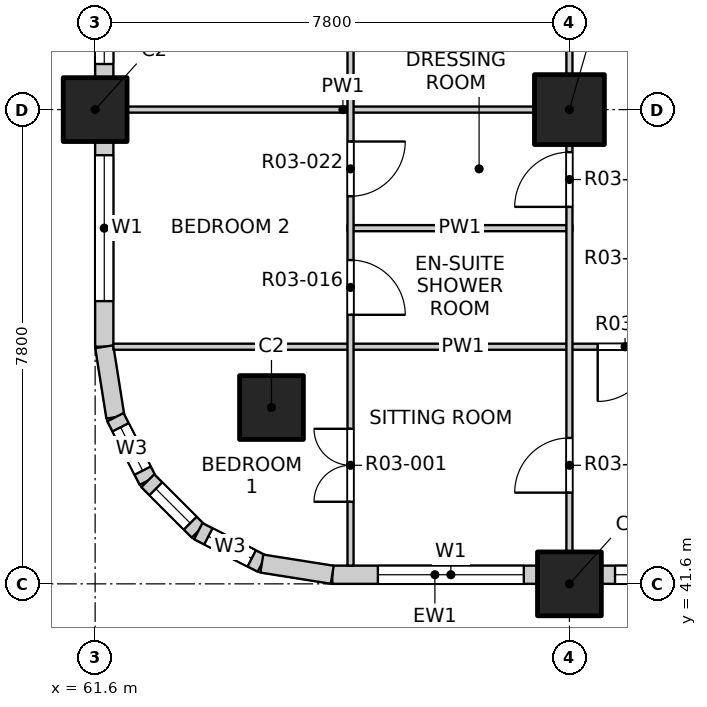
"""IFC4 building model, lengths in metres.
Left out: names, types, materials, properties, quantities, classifications, styles, units other than length and angle.
Written with IfcOpenShell. Run it as: python <this file> out.ifc"""

import sys

from ifc_helpers import new_model, si_unit, direction, frame, frame_2d, origin, origin_2d, place, context, subcontext, project, spatial, rectangle, extrude, element, fill, save


model = new_model("IFC4")
c1 = context("Model", 3, precision=1e-05, world=origin(), true_north=direction((0.0, 1.0)))
c2 = subcontext(c1, "Body", "Model", "MODEL_VIEW")
j1 = project(units=[si_unit("LENGTHUNIT", "METRE"), si_unit("PLANEANGLEUNIT", "RADIAN")], contexts=[c1])
p1 = place(None, origin())
s1 = spatial("IfcSite", under=j1, at=p1, CompositionType="ELEMENT")
p2 = place(p1, origin())
s2 = spatial("IfcBuilding", under=s1, at=p2, CompositionType="ELEMENT")
p3 = place(p2, frame((0.0, 0.0, 43.3)))
s3 = spatial("IfcBuildingStorey", under=s2, at=p3, CompositionType="ELEMENT", Elevation=43.3)
for number, where, z_axis, x_axis in (
    (1, (64.5, 44.5, -0.25), (0.0, 0.0, 1.0), (1.0, 0.0, 0.0)),
    (2, (61.6, 49.4, -0.25), (0.0, 0.0, 1.0), (1.0, 0.0, 0.0)),
    (3, (69.4, 41.6, -0.25), (0.0, 0.0, 1.0), (1.0, 0.0, 0.0)),
):
    element("IfcColumn", number, at=place(p3, frame(where, z_axis=z_axis, x_axis=x_axis)), inside=s3, PredefinedType="COLUMN", context=c2, shape_type="SweptSolid", body=[
        extrude(rectangle(XDim=1.05, YDim=1.05, at=origin_2d()), origin(), (0.0, 0.0, 1.0), 3.35),
    ])
p4 = place(p3, frame((69.4, 49.4, -0.25), z_axis=(0.0, 0.0, 1.0), x_axis=(1.0, 0.0, 0.0)))
e4 = element("IfcColumn", 4, at=p4, inside=s3, PredefinedType="COLUMN", context=c2, shape_type="SweptSolid", body=[
    extrude(rectangle(XDim=1.15, YDim=1.15, at=origin_2d()), origin(), (0.0, 0.0, 1.0), 3.35),
])
p5 = place(p3, frame((65.5, 41.75, 0.0), z_axis=(0.0, 0.0, 1.0), x_axis=(1.0, 0.0, 0.0)))
e5 = element("IfcWall", 5, at=p5, inside=s3, PredefinedType="SOLIDWALL", context=c2, shape_type="SweptSolid", body=[
    extrude(rectangle(XDim=3.375, YDim=0.3, at=frame_2d((1.688, 0.0))), origin(), (0.0, 0.0, 1.0), 3.1),
])
p6 = place(p5, frame((0.75, 0.0, 0.9)))
e6 = element("IfcOpeningElement", 6, at=p6, cuts=e5, PredefinedType="OPENING", context=c2, shape_type="SweptSolid", body=[
    extrude(rectangle(XDim=2.4, YDim=1.8, at=frame_2d((1.2, 0.9))), frame((0.0, 0.16, 0.0), z_axis=(0.0, -1.0, 0.0), x_axis=(1.0, 0.0, 0.0)), (0.0, 0.0, 1.0), 0.32),
])
p7 = place(p3, frame((69.925, 41.75, 0.0), z_axis=(0.0, 0.0, 1.0), x_axis=(1.0, 0.0, 0.0)))
e7 = element("IfcWall", 7, at=p7, inside=s3, PredefinedType="SOLIDWALL", context=c2, shape_type="SweptSolid", body=[
    extrude(rectangle(XDim=6.75, YDim=0.3, at=frame_2d((3.375, 0.0))), origin(), (0.0, 0.0, 1.0), 3.1),
])
p8 = place(p7, frame((0.225, 0.0, 0.9)))
e8 = element("IfcOpeningElement", 8, at=p8, cuts=e7, PredefinedType="OPENING", context=c2, shape_type="SweptSolid", body=[
    extrude(rectangle(XDim=2.4, YDim=1.8, at=frame_2d((1.2, 0.9))), frame((0.0, 0.16, 0.0), z_axis=(0.0, -1.0, 0.0), x_axis=(1.0, 0.0, 0.0)), (0.0, 0.0, 1.0), 0.32),
])
p9 = place(p7, frame((4.125, 0.0, 0.9)))
e9 = element("IfcOpeningElement", 9, at=p9, cuts=e7, PredefinedType="OPENING", context=c2, shape_type="SweptSolid", body=[
    extrude(rectangle(XDim=2.4, YDim=1.8, at=frame_2d((1.2, 0.9))), frame((0.0, 0.16, 0.0), z_axis=(0.0, -1.0, 0.0), x_axis=(1.0, 0.0, 0.0)), (0.0, 0.0, 1.0), 0.32),
])
p10 = place(p3, frame((61.75, 45.5, 0.0), z_axis=(0.0, 0.0, 1.0), x_axis=(0.0, 1.0, 0.0)))
e10 = element("IfcWall", 10, at=p10, inside=s3, PredefinedType="SOLIDWALL", context=c2, shape_type="SweptSolid", body=[
    extrude(rectangle(XDim=3.375, YDim=0.3, at=frame_2d((1.688, 0.0))), origin(), (0.0, 0.0, 1.0), 3.1),
])
p11 = place(p10, frame((0.75, 0.0, 0.9)))
e11 = element("IfcOpeningElement", 11, at=p11, cuts=e10, PredefinedType="OPENING", context=c2, shape_type="SweptSolid", body=[
    extrude(rectangle(XDim=2.4, YDim=1.8, at=frame_2d((1.2, 0.9))), frame((0.0, 0.16, 0.0), z_axis=(0.0, -1.0, 0.0), x_axis=(1.0, 0.0, 0.0)), (0.0, 0.0, 1.0), 0.32),
])
p12 = place(p3, frame((61.75, 49.925, 0.0), z_axis=(0.0, 0.0, 1.0), x_axis=(0.0, 1.0, 0.0)))
e12 = element("IfcWall", 12, at=p12, inside=s3, PredefinedType="SOLIDWALL", context=c2, shape_type="SweptSolid", body=[
    extrude(rectangle(XDim=6.75, YDim=0.3, at=frame_2d((3.375, 0.0))), origin(), (0.0, 0.0, 1.0), 3.1),
])
p13 = place(p12, frame((0.225, 0.0, 0.9)))
e13 = element("IfcOpeningElement", 13, at=p13, cuts=e12, PredefinedType="OPENING", context=c2, shape_type="SweptSolid", body=[
    extrude(rectangle(XDim=2.4, YDim=1.8, at=frame_2d((1.2, 0.9))), frame((0.0, 0.16, 0.0), z_axis=(0.0, -1.0, 0.0), x_axis=(1.0, 0.0, 0.0)), (0.0, 0.0, 1.0), 0.32),
])
p14 = place(p12, frame((4.125, 0.0, 0.9)))
e14 = element("IfcOpeningElement", 14, at=p14, cuts=e12, PredefinedType="OPENING", context=c2, shape_type="SweptSolid", body=[
    extrude(rectangle(XDim=2.4, YDim=1.8, at=frame_2d((1.2, 0.9))), frame((0.0, 0.16, 0.0), z_axis=(0.0, -1.0, 0.0), x_axis=(1.0, 0.0, 0.0)), (0.0, 0.0, 1.0), 0.32),
])
p15 = place(p3, frame((61.75, 45.5, 0.0), z_axis=(0.0, 0.0, 1.0), x_axis=(0.156496880861, -0.987678452879, 0.0)))
e15 = element("IfcWall", 15, at=p15, inside=s3, PredefinedType="SOLIDWALL", context=c2, shape_type="SweptSolid", body=[
    extrude(rectangle(XDim=1.173, YDim=0.3, at=frame_2d((0.586, 0.0))), origin(), (0.0, 0.0, 1.0), 3.1),
])
p16 = place(p3, frame((61.934, 44.341, 0.0), z_axis=(0.0, 0.0, 1.0), x_axis=(0.454025524128, -0.890988677504, 0.0)))
e16 = element("IfcWall", 16, at=p16, inside=s3, PredefinedType="SOLIDWALL", context=c2, shape_type="SweptSolid", body=[
    extrude(rectangle(XDim=1.173, YDim=0.3, at=frame_2d((0.587, 0.0))), origin(), (0.0, 0.0, 1.0), 3.1),
])
p17 = place(p16, frame((0.187, 0.0, 0.9)))
e17 = element("IfcOpeningElement", 17, at=p17, cuts=e16, PredefinedType="OPENING", context=c2, shape_type="SweptSolid", body=[
    extrude(rectangle(XDim=0.8, YDim=1.2, at=frame_2d((0.4, 0.6))), frame((0.0, 0.16, 0.0), z_axis=(0.0, -1.0, 0.0), x_axis=(1.0, 0.0, 0.0)), (0.0, 0.0, 1.0), 0.32),
])
p18 = place(p3, frame((62.466, 43.296, 0.0), z_axis=(0.0, 0.0, 1.0), x_axis=(0.707106781187, -0.707106781187, 0.0)))
e18 = element("IfcWall", 18, at=p18, inside=s3, PredefinedType="SOLIDWALL", context=c2, shape_type="SweptSolid", body=[
    extrude(rectangle(XDim=1.173, YDim=0.3, at=frame_2d((0.586, 0.0))), origin(), (0.0, 0.0, 1.0), 3.1),
])
p19 = place(p18, frame((0.187, 0.0, 0.9)))
e19 = element("IfcOpeningElement", 19, at=p19, cuts=e18, PredefinedType="OPENING", context=c2, shape_type="SweptSolid", body=[
    extrude(rectangle(XDim=0.8, YDim=1.2, at=frame_2d((0.4, 0.6))), frame((0.0, 0.16, 0.0), z_axis=(0.0, -1.0, 0.0), x_axis=(1.0, 0.0, 0.0)), (0.0, 0.0, 1.0), 0.32),
])
p20 = place(p3, frame((63.296, 42.466, 0.0), z_axis=(0.0, 0.0, 1.0), x_axis=(0.890988677504, -0.454025524128, 0.0)))
e20 = element("IfcWall", 20, at=p20, inside=s3, PredefinedType="SOLIDWALL", context=c2, shape_type="SweptSolid", body=[
    extrude(rectangle(XDim=1.173, YDim=0.3, at=frame_2d((0.587, 0.0))), origin(), (0.0, 0.0, 1.0), 3.1),
])
p21 = place(p20, frame((0.187, 0.0, 0.9)))
e21 = element("IfcOpeningElement", 21, at=p21, cuts=e20, PredefinedType="OPENING", context=c2, shape_type="SweptSolid", body=[
    extrude(rectangle(XDim=0.8, YDim=1.2, at=frame_2d((0.4, 0.6))), frame((0.0, 0.16, 0.0), z_axis=(0.0, -1.0, 0.0), x_axis=(1.0, 0.0, 0.0)), (0.0, 0.0, 1.0), 0.32),
])
p22 = place(p3, frame((64.341, 41.934, 0.0), z_axis=(0.0, 0.0, 1.0), x_axis=(0.987678452879, -0.156496880861, 0.0)))
e22 = element("IfcWall", 22, at=p22, inside=s3, PredefinedType="SOLIDWALL", context=c2, shape_type="SweptSolid", body=[
    extrude(rectangle(XDim=1.173, YDim=0.3, at=frame_2d((0.586, 0.0))), origin(), (0.0, 0.0, 1.0), 3.1),
])
p23 = place(p3, frame((61.9, 45.5, 0.0), z_axis=(0.0, 0.0, 1.0), x_axis=(1.0, 0.0, 0.0)))
e23 = element("IfcWall", 23, at=p23, inside=s3, PredefinedType="PARTITIONING", context=c2, shape_type="SweptSolid", body=[
    extrude(rectangle(XDim=11.5, YDim=0.1, at=frame_2d((5.75, 0.0))), origin(), (0.0, 0.0, 1.0), 3.1),
])
p24 = place(p23, frame((7.965, 0.0, 0.0)))
e24 = element("IfcOpeningElement", 24, at=p24, cuts=e23, PredefinedType="OPENING", context=c2, shape_type="SweptSolid", body=[
    extrude(rectangle(XDim=0.9, YDim=2.1, at=frame_2d((0.45, 1.05))), frame((0.0, 0.06, 0.0), z_axis=(0.0, -1.0, 0.0), x_axis=(1.0, 0.0, 0.0)), (0.0, 0.0, 1.0), 0.12),
])
p25 = place(p3, frame((65.75, 47.45, 0.0), z_axis=(0.0, 0.0, 1.0), x_axis=(1.0, 0.0, 0.0)))
e25 = element("IfcWall", 25, at=p25, inside=s3, PredefinedType="PARTITIONING", context=c2, shape_type="SweptSolid", body=[
    extrude(rectangle(XDim=3.7, YDim=0.1, at=frame_2d((1.85, 0.0))), origin(), (0.0, 0.0, 1.0), 3.1),
])
p26 = place(p3, frame((61.9, 49.4, 0.0), z_axis=(0.0, 0.0, 1.0), x_axis=(1.0, 0.0, 0.0)))
e26 = element("IfcWall", 26, at=p26, inside=s3, PredefinedType="PARTITIONING", context=c2, shape_type="SweptSolid", body=[
    extrude(rectangle(XDim=7.55, YDim=0.1, at=frame_2d((3.775, 0.0))), origin(), (0.0, 0.0, 1.0), 3.1),
])
p27 = place(p3, frame((65.8, 41.9, 0.0), z_axis=(0.0, 0.0, 1.0), x_axis=(0.0, 1.0, 0.0)))
e27 = element("IfcWall", 27, at=p27, inside=s3, PredefinedType="PARTITIONING", context=c2, shape_type="SweptSolid", body=[
    extrude(rectangle(XDim=19.1, YDim=0.1, at=frame_2d((9.55, 0.0))), origin(), (0.0, 0.0, 1.0), 3.1),
])
p28 = place(p27, frame((1.05, 0.0, 0.0)))
e28 = element("IfcOpeningElement", 28, at=p28, cuts=e27, PredefinedType="OPENING", context=c2, shape_type="SweptSolid", body=[
    extrude(rectangle(XDim=1.2, YDim=2.1, at=frame_2d((0.6, 1.05))), frame((0.0, 0.06, 0.0), z_axis=(0.0, -1.0, 0.0), x_axis=(1.0, 0.0, 0.0)), (0.0, 0.0, 1.0), 0.12),
])
p29 = place(p27, frame((4.125, 0.0, 0.0)))
e29 = element("IfcOpeningElement", 29, at=p29, cuts=e27, PredefinedType="OPENING", context=c2, shape_type="SweptSolid", body=[
    extrude(rectangle(XDim=0.9, YDim=2.1, at=frame_2d((0.45, 1.05))), frame((0.0, 0.06, 0.0), z_axis=(0.0, -1.0, 0.0), x_axis=(1.0, 0.0, 0.0)), (0.0, 0.0, 1.0), 0.12),
])
p30 = place(p27, frame((6.075, 0.0, 0.0)))
e30 = element("IfcOpeningElement", 30, at=p30, cuts=e27, PredefinedType="OPENING", context=c2, shape_type="SweptSolid", body=[
    extrude(rectangle(XDim=0.9, YDim=2.1, at=frame_2d((0.45, 1.05))), frame((0.0, 0.06, 0.0), z_axis=(0.0, -1.0, 0.0), x_axis=(1.0, 0.0, 0.0)), (0.0, 0.0, 1.0), 0.12),
])
p31 = place(p27, frame((8.85, 0.0, 0.0)))
e31 = element("IfcOpeningElement", 31, at=p31, cuts=e27, PredefinedType="OPENING", context=c2, shape_type="SweptSolid", body=[
    extrude(rectangle(XDim=1.2, YDim=2.1, at=frame_2d((0.6, 1.05))), frame((0.0, 0.06, 0.0), z_axis=(0.0, -1.0, 0.0), x_axis=(1.0, 0.0, 0.0)), (0.0, 0.0, 1.0), 0.12),
])
p32 = place(p27, frame((11.925, 0.0, 0.0)))
e32 = element("IfcOpeningElement", 32, at=p32, cuts=e27, PredefinedType="OPENING", context=c2, shape_type="SweptSolid", body=[
    extrude(rectangle(XDim=0.9, YDim=2.1, at=frame_2d((0.45, 1.05))), frame((0.0, 0.06, 0.0), z_axis=(0.0, -1.0, 0.0), x_axis=(1.0, 0.0, 0.0)), (0.0, 0.0, 1.0), 0.12),
])
p33 = place(p27, frame((13.875, 0.0, 0.0)))
e33 = element("IfcOpeningElement", 33, at=p33, cuts=e27, PredefinedType="OPENING", context=c2, shape_type="SweptSolid", body=[
    extrude(rectangle(XDim=0.9, YDim=2.1, at=frame_2d((0.45, 1.05))), frame((0.0, 0.06, 0.0), z_axis=(0.0, -1.0, 0.0), x_axis=(1.0, 0.0, 0.0)), (0.0, 0.0, 1.0), 0.12),
])
p34 = place(p27, frame((15.825, 0.0, 0.0)))
e34 = element("IfcOpeningElement", 34, at=p34, cuts=e27, PredefinedType="OPENING", context=c2, shape_type="SweptSolid", body=[
    extrude(rectangle(XDim=0.9, YDim=2.1, at=frame_2d((0.45, 1.05))), frame((0.0, 0.06, 0.0), z_axis=(0.0, -1.0, 0.0), x_axis=(1.0, 0.0, 0.0)), (0.0, 0.0, 1.0), 0.12),
])
p35 = place(p27, frame((17.775, 0.0, 0.0)))
e35 = element("IfcOpeningElement", 35, at=p35, cuts=e27, PredefinedType="OPENING", context=c2, shape_type="SweptSolid", body=[
    extrude(rectangle(XDim=0.9, YDim=2.1, at=frame_2d((0.45, 1.05))), frame((0.0, 0.06, 0.0), z_axis=(0.0, -1.0, 0.0), x_axis=(1.0, 0.0, 0.0)), (0.0, 0.0, 1.0), 0.12),
])
p36 = place(p3, frame((69.4, 41.9, 0.0), z_axis=(0.0, 0.0, 1.0), x_axis=(0.0, 1.0, 0.0)))
e36 = element("IfcWall", 36, at=p36, inside=s3, PredefinedType="PARTITIONING", context=c2, shape_type="SweptSolid", body=[
    extrude(rectangle(XDim=46.2, YDim=0.1, at=frame_2d((23.1, 0.0))), origin(), (0.0, 0.0, 1.0), 3.1),
])
p37 = place(p36, frame((1.2, 0.0, 0.0)))
e37 = element("IfcOpeningElement", 37, at=p37, cuts=e36, PredefinedType="OPENING", context=c2, shape_type="SweptSolid", body=[
    extrude(rectangle(XDim=0.9, YDim=2.1, at=frame_2d((0.45, 1.05))), frame((0.0, 0.06, 0.0), z_axis=(0.0, -1.0, 0.0), x_axis=(1.0, 0.0, 0.0)), (0.0, 0.0, 1.0), 0.12),
])
p38 = place(p36, frame((5.9, 0.0, 0.0)))
e38 = element("IfcOpeningElement", 38, at=p38, cuts=e36, PredefinedType="OPENING", context=c2, shape_type="SweptSolid", body=[
    extrude(rectangle(XDim=0.9, YDim=2.1, at=frame_2d((0.45, 1.05))), frame((0.0, 0.06, 0.0), z_axis=(0.0, -1.0, 0.0), x_axis=(1.0, 0.0, 0.0)), (0.0, 0.0, 1.0), 0.12),
])
p39 = place(p36, frame((9.0, 0.0, 0.0)))
e39 = element("IfcOpeningElement", 39, at=p39, cuts=e36, PredefinedType="OPENING", context=c2, shape_type="SweptSolid", body=[
    extrude(rectangle(XDim=0.9, YDim=2.1, at=frame_2d((0.45, 1.05))), frame((0.0, 0.06, 0.0), z_axis=(0.0, -1.0, 0.0), x_axis=(1.0, 0.0, 0.0)), (0.0, 0.0, 1.0), 0.12),
])
p40 = place(p36, frame((13.725, 0.0, 0.0)))
e40 = element("IfcOpeningElement", 40, at=p40, cuts=e36, PredefinedType="OPENING", context=c2, shape_type="SweptSolid", body=[
    extrude(rectangle(XDim=0.9, YDim=2.1, at=frame_2d((0.45, 1.05))), frame((0.0, 0.06, 0.0), z_axis=(0.0, -1.0, 0.0), x_axis=(1.0, 0.0, 0.0)), (0.0, 0.0, 1.0), 0.12),
])
p41 = place(p36, frame((17.775, 0.0, 0.0)))
e41 = element("IfcOpeningElement", 41, at=p41, cuts=e36, PredefinedType="OPENING", context=c2, shape_type="SweptSolid", body=[
    extrude(rectangle(XDim=0.9, YDim=2.1, at=frame_2d((0.45, 1.05))), frame((0.0, 0.06, 0.0), z_axis=(0.0, -1.0, 0.0), x_axis=(1.0, 0.0, 0.0)), (0.0, 0.0, 1.0), 0.12),
])
p42 = place(p36, frame((20.7, 0.0, 0.0)))
e42 = element("IfcOpeningElement", 42, at=p42, cuts=e36, PredefinedType="OPENING", context=c2, shape_type="SweptSolid", body=[
    extrude(rectangle(XDim=0.9, YDim=2.1, at=frame_2d((0.45, 1.05))), frame((0.0, 0.06, 0.0), z_axis=(0.0, -1.0, 0.0), x_axis=(1.0, 0.0, 0.0)), (0.0, 0.0, 1.0), 0.12),
])
p43 = place(p36, frame((25.575, 0.0, 0.0)))
e43 = element("IfcOpeningElement", 43, at=p43, cuts=e36, PredefinedType="OPENING", context=c2, shape_type="SweptSolid", body=[
    extrude(rectangle(XDim=0.9, YDim=2.1, at=frame_2d((0.45, 1.05))), frame((0.0, 0.06, 0.0), z_axis=(0.0, -1.0, 0.0), x_axis=(1.0, 0.0, 0.0)), (0.0, 0.0, 1.0), 0.12),
])
p44 = place(p36, frame((28.5, 0.0, 0.0)))
e44 = element("IfcOpeningElement", 44, at=p44, cuts=e36, PredefinedType="OPENING", context=c2, shape_type="SweptSolid", body=[
    extrude(rectangle(XDim=0.9, YDim=2.1, at=frame_2d((0.45, 1.05))), frame((0.0, 0.06, 0.0), z_axis=(0.0, -1.0, 0.0), x_axis=(1.0, 0.0, 0.0)), (0.0, 0.0, 1.0), 0.12),
])
p45 = place(p36, frame((33.375, 0.0, 0.0)))
e45 = element("IfcOpeningElement", 45, at=p45, cuts=e36, PredefinedType="OPENING", context=c2, shape_type="SweptSolid", body=[
    extrude(rectangle(XDim=0.9, YDim=2.1, at=frame_2d((0.45, 1.05))), frame((0.0, 0.06, 0.0), z_axis=(0.0, -1.0, 0.0), x_axis=(1.0, 0.0, 0.0)), (0.0, 0.0, 1.0), 0.12),
])
p46 = place(p36, frame((36.3, 0.0, 0.0)))
e46 = element("IfcOpeningElement", 46, at=p46, cuts=e36, PredefinedType="OPENING", context=c2, shape_type="SweptSolid", body=[
    extrude(rectangle(XDim=0.9, YDim=2.1, at=frame_2d((0.45, 1.05))), frame((0.0, 0.06, 0.0), z_axis=(0.0, -1.0, 0.0), x_axis=(1.0, 0.0, 0.0)), (0.0, 0.0, 1.0), 0.12),
])
p47 = place(p36, frame((40.2, 0.0, 0.0)))
e47 = element("IfcOpeningElement", 47, at=p47, cuts=e36, PredefinedType="OPENING", context=c2, shape_type="SweptSolid", body=[
    extrude(rectangle(XDim=0.9, YDim=2.1, at=frame_2d((0.45, 1.05))), frame((0.0, 0.06, 0.0), z_axis=(0.0, -1.0, 0.0), x_axis=(1.0, 0.0, 0.0)), (0.0, 0.0, 1.0), 0.12),
])
p48 = place(p36, frame((44.1, 0.0, 0.0)))
e48 = element("IfcOpeningElement", 48, at=p48, cuts=e36, PredefinedType="OPENING", context=c2, shape_type="SweptSolid", body=[
    extrude(rectangle(XDim=0.9, YDim=2.1, at=frame_2d((0.45, 1.05))), frame((0.0, 0.06, 0.0), z_axis=(0.0, -1.0, 0.0), x_axis=(1.0, 0.0, 0.0)), (0.0, 0.0, 1.0), 0.12),
])
p49 = place(p6, origin())
e49 = element("IfcWindow", 49, at=p49, inside=s3, PartitioningType="DOUBLE_PANEL_VERTICAL", PredefinedType="WINDOW", context=c2, shape_type="SweptSolid", body=[
    extrude(rectangle(XDim=2.4, YDim=1.8, at=frame_2d((1.2, 0.9))), frame((0.0, 0.03, 0.0), z_axis=(0.0, -1.0, 0.0), x_axis=(1.0, 0.0, 0.0)), (0.0, 0.0, 1.0), 0.06),
])
fill(e6, e49)
p50 = place(p8, origin())
e50 = element("IfcWindow", 50, at=p50, inside=s3, PartitioningType="DOUBLE_PANEL_VERTICAL", PredefinedType="WINDOW", context=c2, shape_type="SweptSolid", body=[
    extrude(rectangle(XDim=2.4, YDim=1.8, at=frame_2d((1.2, 0.9))), frame((0.0, 0.03, 0.0), z_axis=(0.0, -1.0, 0.0), x_axis=(1.0, 0.0, 0.0)), (0.0, 0.0, 1.0), 0.06),
])
fill(e8, e50)
p51 = place(p11, origin())
e51 = element("IfcWindow", 51, at=p51, inside=s3, PartitioningType="DOUBLE_PANEL_VERTICAL", PredefinedType="WINDOW", context=c2, shape_type="SweptSolid", body=[
    extrude(rectangle(XDim=2.4, YDim=1.8, at=frame_2d((1.2, 0.9))), frame((0.0, 0.03, 0.0), z_axis=(0.0, -1.0, 0.0), x_axis=(1.0, 0.0, 0.0)), (0.0, 0.0, 1.0), 0.06),
])
fill(e11, e51)
p52 = place(p13, origin())
e52 = element("IfcWindow", 52, at=p52, inside=s3, PartitioningType="DOUBLE_PANEL_VERTICAL", PredefinedType="WINDOW", context=c2, shape_type="SweptSolid", body=[
    extrude(rectangle(XDim=2.4, YDim=1.8, at=frame_2d((1.2, 0.9))), frame((0.0, 0.03, 0.0), z_axis=(0.0, -1.0, 0.0), x_axis=(1.0, 0.0, 0.0)), (0.0, 0.0, 1.0), 0.06),
])
fill(e13, e52)
p53 = place(p17, origin())
e53 = element("IfcWindow", 53, at=p53, inside=s3, PartitioningType="SINGLE_PANEL", PredefinedType="WINDOW", context=c2, shape_type="SweptSolid", body=[
    extrude(rectangle(XDim=0.8, YDim=1.2, at=frame_2d((0.4, 0.6))), frame((0.0, 0.03, 0.0), z_axis=(0.0, -1.0, 0.0), x_axis=(1.0, 0.0, 0.0)), (0.0, 0.0, 1.0), 0.06),
])
fill(e17, e53)
p54 = place(p19, origin())
e54 = element("IfcWindow", 54, at=p54, inside=s3, PartitioningType="SINGLE_PANEL", PredefinedType="WINDOW", context=c2, shape_type="SweptSolid", body=[
    extrude(rectangle(XDim=0.8, YDim=1.2, at=frame_2d((0.4, 0.6))), frame((0.0, 0.03, 0.0), z_axis=(0.0, -1.0, 0.0), x_axis=(1.0, 0.0, 0.0)), (0.0, 0.0, 1.0), 0.06),
])
fill(e19, e54)
p55 = place(p21, origin())
e55 = element("IfcWindow", 55, at=p55, inside=s3, PartitioningType="SINGLE_PANEL", PredefinedType="WINDOW", context=c2, shape_type="SweptSolid", body=[
    extrude(rectangle(XDim=0.8, YDim=1.2, at=frame_2d((0.4, 0.6))), frame((0.0, 0.03, 0.0), z_axis=(0.0, -1.0, 0.0), x_axis=(1.0, 0.0, 0.0)), (0.0, 0.0, 1.0), 0.06),
])
fill(e21, e55)
p56 = place(p28, origin())
e56 = element("IfcDoor", 56, at=p56, inside=s3, OperationType="DOUBLE_DOOR_SINGLE_SWING", PredefinedType="DOOR", context=c2, shape_type="SweptSolid", body=[
    extrude(rectangle(XDim=1.2, YDim=2.1, at=frame_2d((0.6, 1.05))), frame((0.0, 0.025, 0.0), z_axis=(0.0, -1.0, 0.0), x_axis=(1.0, 0.0, 0.0)), (0.0, 0.0, 1.0), 0.05),
])
fill(e28, e56)
p57 = place(p37, origin())
e57 = element("IfcDoor", 57, at=p57, inside=s3, OperationType="SINGLE_SWING_LEFT", PredefinedType="DOOR", context=c2, shape_type="SweptSolid", body=[
    extrude(rectangle(XDim=0.9, YDim=2.1, at=frame_2d((0.45, 1.05))), frame((0.0, 0.025, 0.0), z_axis=(0.0, -1.0, 0.0), x_axis=(1.0, 0.0, 0.0)), (0.0, 0.0, 1.0), 0.05),
])
fill(e37, e57)
p58 = place(p24, origin())
e58 = element("IfcDoor", 58, at=p58, inside=s3, OperationType="SINGLE_SWING_RIGHT", PredefinedType="DOOR", context=c2, shape_type="SweptSolid", body=[
    extrude(rectangle(XDim=0.9, YDim=2.1, at=frame_2d((0.45, 1.05))), frame((0.0, 0.025, 0.0), z_axis=(0.0, -1.0, 0.0), x_axis=(1.0, 0.0, 0.0)), (0.0, 0.0, 1.0), 0.05),
])
fill(e24, e58)
p59 = place(p29, origin())
e59 = element("IfcDoor", 59, at=p59, inside=s3, OperationType="SINGLE_SWING_RIGHT", PredefinedType="DOOR", context=c2, shape_type="SweptSolid", body=[
    extrude(rectangle(XDim=0.9, YDim=2.1, at=frame_2d((0.45, 1.05))), frame((0.0, 0.025, 0.0), z_axis=(0.0, -1.0, 0.0), x_axis=(1.0, 0.0, 0.0)), (0.0, 0.0, 1.0), 0.05),
])
fill(e29, e59)
p60 = place(p38, origin())
e60 = element("IfcDoor", 60, at=p60, inside=s3, OperationType="SINGLE_SWING_LEFT", PredefinedType="DOOR", context=c2, shape_type="SweptSolid", body=[
    extrude(rectangle(XDim=0.9, YDim=2.1, at=frame_2d((0.45, 1.05))), frame((0.0, 0.025, 0.0), z_axis=(0.0, -1.0, 0.0), x_axis=(1.0, 0.0, 0.0)), (0.0, 0.0, 1.0), 0.05),
])
fill(e38, e60)
p61 = place(p30, origin())
e61 = element("IfcDoor", 61, at=p61, inside=s3, OperationType="SINGLE_SWING_LEFT", PredefinedType="DOOR", context=c2, shape_type="SweptSolid", body=[
    extrude(rectangle(XDim=0.9, YDim=2.1, at=frame_2d((0.45, 1.05))), frame((0.0, 0.025, 0.0), z_axis=(0.0, -1.0, 0.0), x_axis=(1.0, 0.0, 0.0)), (0.0, 0.0, 1.0), 0.05),
])
fill(e30, e61)
save(model, sys.argv[1])
